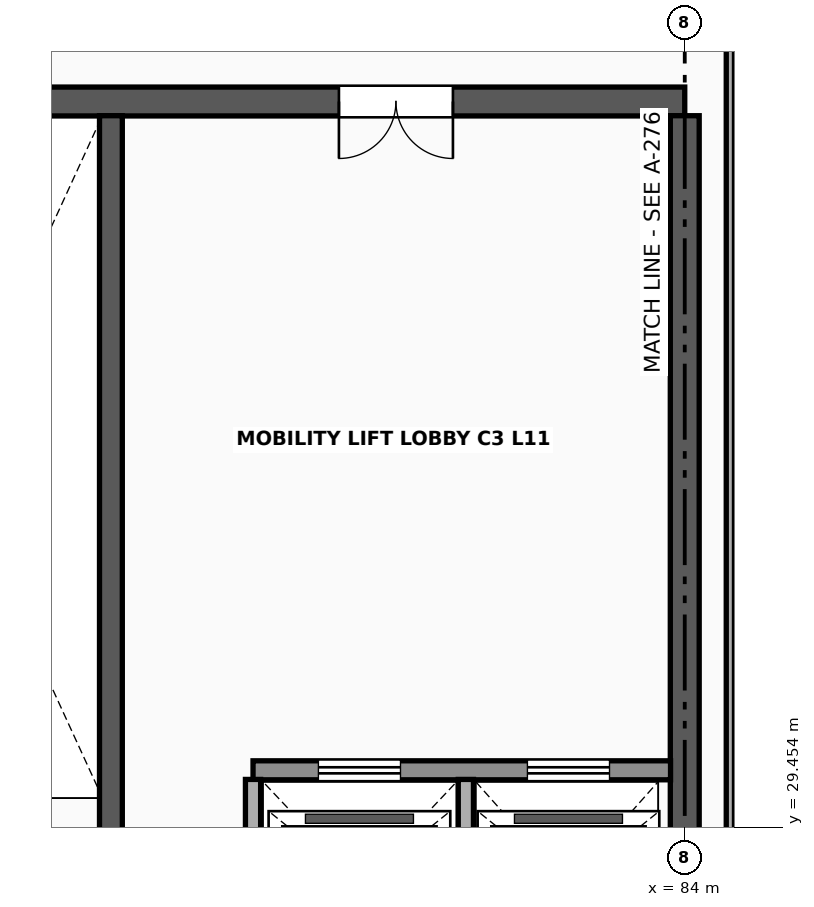
"""IFC4 building model, lengths in metres.
Left out: names, types, materials, properties, quantities, classifications, styles, units other than length and angle.
Written with IfcOpenShell. Run it as: python <this file> out.ifc"""

import sys

from ifc_helpers import new_model, si_unit, direction, frame, frame_2d, origin, place, context, subcontext, project, spatial, rectangle, extrude, element, fill, save


model = new_model("IFC4")
c1 = context("Model", 3, precision=1e-05, world=origin(), true_north=direction((0.0, 1.0)))
c2 = subcontext(c1, "Body", "Model", "MODEL_VIEW")
j1 = project(units=[si_unit("LENGTHUNIT", "METRE"), si_unit("PLANEANGLEUNIT", "RADIAN")], contexts=[c1])
p1 = place(None, origin())
s1 = spatial("IfcSite", under=j1, at=p1, CompositionType="ELEMENT")
p2 = place(p1, origin())
s2 = spatial("IfcBuilding", under=s1, at=p2, CompositionType="ELEMENT")
p3 = place(p2, frame((0.0, 0.0, 45.6)))
s3 = spatial("IfcBuildingStorey", under=s2, at=p3, CompositionType="ELEMENT", Elevation=45.6)
p4 = place(p3, frame((72.0, 39.0, 0.0), z_axis=(0.0, 0.0, 1.0), x_axis=(1.0, 0.0, 0.0)))
e1 = element("IfcWall", 1, at=p4, inside=s3, PredefinedType="SHEAR", context=c2, shape_type="SweptSolid", body=[
    extrude(rectangle(XDim=12.0, YDim=0.38, at=frame_2d((6.0, 0.0))), origin(), (0.0, 0.0, 1.0), 3.783),
])
p5 = place(p4, frame((7.45, 0.0, 0.0)))
e2 = element("IfcOpeningElement", 2, at=p5, cuts=e1, PredefinedType="OPENING", context=c2, shape_type="SweptSolid", body=[
    extrude(rectangle(XDim=1.5, YDim=2.25, at=frame_2d((0.75, 1.125))), frame((0.0, 0.205, 0.0), z_axis=(0.0, -1.0, 0.0), x_axis=(1.0, 0.0, 0.0)), (0.0, 0.0, 1.0), 0.41),
])
p6 = place(p3, frame((84.0, 27.185, 0.0), z_axis=(0.0, 0.0, 1.0), x_axis=(0.0, 1.0, 0.0)))
e3 = element("IfcWall", 3, at=p6, inside=s3, PredefinedType="SHEAR", context=c2, shape_type="SweptSolid", body=[
    extrude(rectangle(XDim=11.628, YDim=0.38, at=frame_2d((5.814, 0.0))), origin(), (0.0, 0.0, 1.0), 3.783),
])
p7 = place(p3, frame((76.45, 27.187, 0.0), z_axis=(0.0, 0.0, 1.0), x_axis=(0.0, 1.0, 0.0)))
e4 = element("IfcWall", 4, at=p7, inside=s3, PredefinedType="SHEAR", context=c2, shape_type="SweptSolid", body=[
    extrude(rectangle(XDim=11.626, YDim=0.3, at=frame_2d((5.813, 0.0))), origin(), (0.0, 0.0, 1.0), 3.783),
])
p8 = place(p7, frame((0.9, 0.0, 0.0)))
e5 = element("IfcOpeningElement", 5, at=p8, cuts=e4, PredefinedType="OPENING", context=c2, shape_type="SweptSolid", body=[
    extrude(rectangle(XDim=1.1, YDim=2.2, at=frame_2d((0.55, 1.1))), frame((0.0, 0.165, 0.0), z_axis=(0.0, -1.0, 0.0), x_axis=(1.0, 0.0, 0.0)), (0.0, 0.0, 1.0), 0.33),
])
p9 = place(p3, frame((78.32, 30.2, 0.0), z_axis=(0.0, 0.0, 1.0), x_axis=(1.0, 0.0, 0.0)))
e6 = element("IfcWall", 6, at=p9, inside=s3, PredefinedType="SOLIDWALL", context=c2, shape_type="SweptSolid", body=[
    extrude(rectangle(XDim=5.493, YDim=0.25, at=frame_2d((2.747, 0.0))), origin(), (0.0, 0.0, 1.0), 3.783),
])
p10 = place(p9, frame((0.86, 0.0, 0.0)))
e7 = element("IfcOpeningElement", 7, at=p10, cuts=e6, PredefinedType="OPENING", context=c2, shape_type="SweptSolid", body=[
    extrude(rectangle(XDim=1.08, YDim=2.22, at=frame_2d((0.54, 1.11))), frame((0.0, 0.14, 0.0), z_axis=(0.0, -1.0, 0.0), x_axis=(1.0, 0.0, 0.0)), (0.0, 0.0, 1.0), 0.28),
])
p11 = place(p9, frame((3.61, 0.0, 0.0)))
e8 = element("IfcOpeningElement", 8, at=p11, cuts=e6, PredefinedType="OPENING", context=c2, shape_type="SweptSolid", body=[
    extrude(rectangle(XDim=1.08, YDim=2.22, at=frame_2d((0.54, 1.11))), frame((0.0, 0.14, 0.0), z_axis=(0.0, -1.0, 0.0), x_axis=(1.0, 0.0, 0.0)), (0.0, 0.0, 1.0), 0.28),
])
for number, where, z_axis, x_axis in (
    (9, (78.32, 27.19, 0.0), (0.0, 0.0, 1.0), (0.0, 1.0, 0.0)),
    (10, (81.12, 27.19, 0.0), (0.0, 0.0, 1.0), (0.0, 1.0, 0.0)),
):
    element("IfcWall", number, at=place(p3, frame(where, z_axis=z_axis, x_axis=x_axis)), inside=s3, PredefinedType="SOLIDWALL", context=c2, shape_type="SweptSolid", body=[
        extrude(rectangle(XDim=2.89, YDim=0.2, at=frame_2d((1.445, 0.0))), origin(), (0.0, 0.0, 1.0), 3.773),
    ])
p12 = place(p3, frame((84.6, 27.14, 0.0), z_axis=(0.0, 0.0, 1.0), x_axis=(0.0, 1.0, 0.0)))
e11 = element("IfcWall", 11, at=p12, inside=s3, PredefinedType="MOVABLE", context=c2, shape_type="SweptSolid", body=[
    extrude(rectangle(XDim=25.7, YDim=0.108, at=frame_2d((12.85, 0.0))), origin(), (0.0, 0.0, 1.0), 2.88),
])
p13 = place(p5, origin())
e12 = element("IfcDoor", 12, at=p13, inside=s3, OperationType="DOUBLE_DOOR_SINGLE_SWING", PredefinedType="DOOR", context=c2, shape_type="SweptSolid", body=[
    extrude(rectangle(XDim=1.5, YDim=2.25, at=frame_2d((0.75, 1.125))), frame((0.0, 0.025, 0.0), z_axis=(0.0, -1.0, 0.0), x_axis=(1.0, 0.0, 0.0)), (0.0, 0.0, 1.0), 0.05),
])
fill(e2, e12)
p14 = place(p10, origin())
e13 = element("IfcDoor", 13, at=p14, inside=s3, OperationType="SLIDING_TO_LEFT", PredefinedType="USERDEFINED", context=c2, shape_type="SweptSolid", body=[
    extrude(rectangle(XDim=1.08, YDim=2.22, at=frame_2d((0.54, 1.11))), frame((0.0, 0.025, 0.0), z_axis=(0.0, -1.0, 0.0), x_axis=(1.0, 0.0, 0.0)), (0.0, 0.0, 1.0), 0.05),
])
fill(e7, e13)
p15 = place(p11, origin())
e14 = element("IfcDoor", 14, at=p15, inside=s3, OperationType="SLIDING_TO_LEFT", PredefinedType="USERDEFINED", context=c2, shape_type="SweptSolid", body=[
    extrude(rectangle(XDim=1.08, YDim=2.22, at=frame_2d((0.54, 1.11))), frame((0.0, 0.025, 0.0), z_axis=(0.0, -1.0, 0.0), x_axis=(1.0, 0.0, 0.0)), (0.0, 0.0, 1.0), 0.05),
])
fill(e8, e14)
save(model, sys.argv[1])
